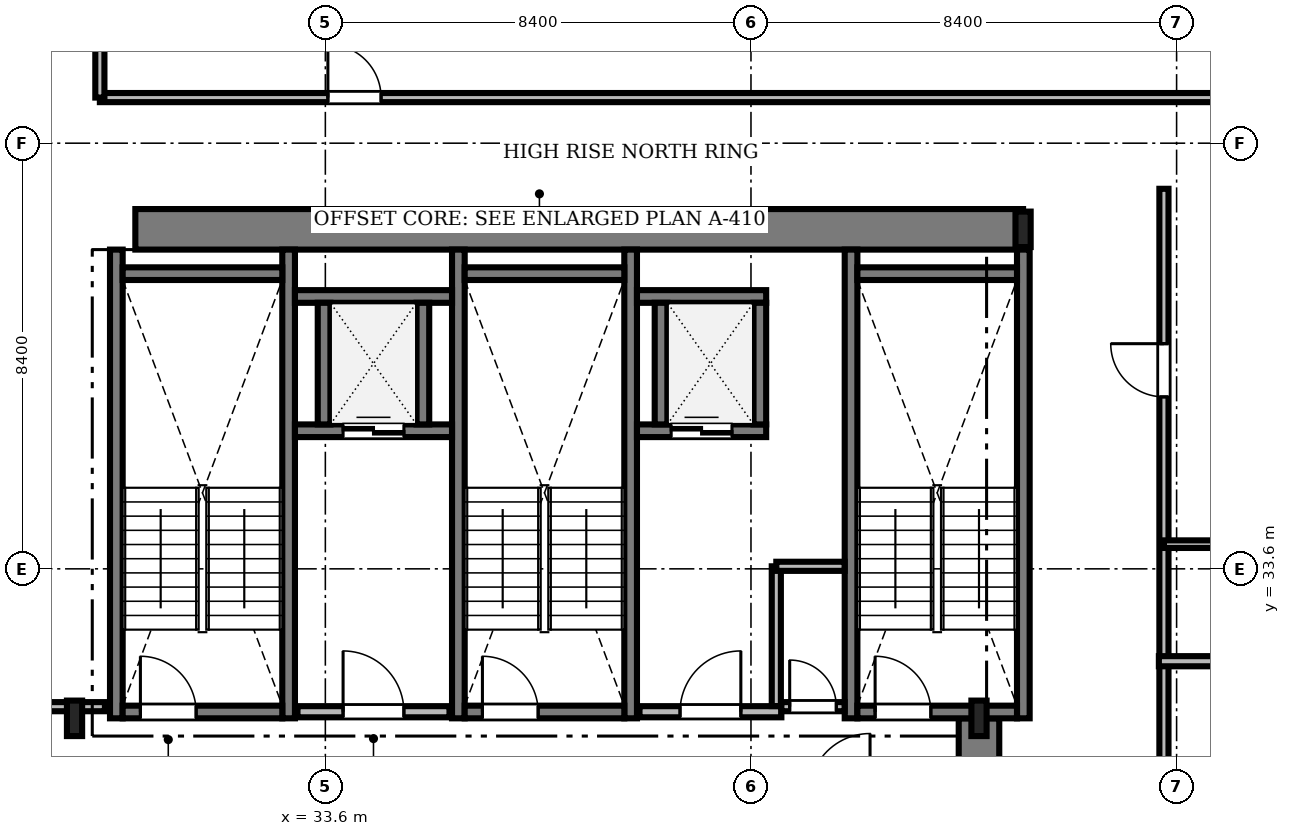
"""IFC4 building model, lengths in metres.
Left out: names, types, materials, properties, quantities, classifications, styles, units other than length and angle.
Written with IfcOpenShell. Run it as: python <this file> out.ifc"""

import sys

from ifc_helpers import new_model, si_unit, direction, frame, frame_2d, origin, origin_2d, place, context, subcontext, project, spatial, rectangle, i_section, extrude, source, transform, mapped, element, fill, save


model = new_model("IFC4")
c1 = context("Model", 3, precision=1e-05, world=origin(), true_north=direction((0.0, 1.0)))
c2 = subcontext(c1, "Body", "Model", "MODEL_VIEW")
j1 = project(units=[si_unit("LENGTHUNIT", "METRE"), si_unit("PLANEANGLEUNIT", "RADIAN")], contexts=[c1])
p1 = place(None, origin())
s1 = spatial("IfcSite", under=j1, at=p1, CompositionType="ELEMENT")
p2 = place(p1, origin())
s2 = spatial("IfcBuilding", under=s1, at=p2, CompositionType="ELEMENT")
p3 = place(p2, frame((0.0, 0.0, 222.3)))
s3 = spatial("IfcBuildingStorey", under=s2, at=p3, CompositionType="ELEMENT", Elevation=222.3)
m1 = source(origin(), c2, "Body", "SweptSolid", [
    extrude(rectangle(XDim=17.52, YDim=0.8, at=frame_2d((8.76, 0.0))), origin(), (0.0, 0.0, 1.0), 3.53),
])
p4 = place(p3, frame((29.85, 40.3, 0.0), z_axis=(0.0, 0.0, 1.0), x_axis=(1.0, 0.0, 0.0)))
e1 = element("IfcWall", 1, at=p4, inside=s3, PredefinedType="SHEAR", context=c2, shape_type="MappedRepresentation", body=[
    mapped(m1, transform((0.0, 0.0, 0.0), scale=1.0)),
])
m2 = source(origin(), c2, "Body", "SweptSolid", [
    extrude(rectangle(XDim=13.15, YDim=0.8, at=frame_2d((6.575, 0.0))), origin(), (0.0, 0.0, 1.0), 3.53),
])
p5 = place(p3, frame((46.5, 17.5, 0.0), z_axis=(0.0, 0.0, 1.0), x_axis=(0.0, 1.0, 0.0)))
e2 = element("IfcWall", 2, at=p5, inside=s3, PredefinedType="SHEAR", context=c2, shape_type="MappedRepresentation", body=[
    mapped(m2, transform((0.0, 0.0, 0.0), scale=1.0)),
])
m3 = source(origin(), c2, "Body", "SweptSolid", [
    extrude(i_section(OverallWidth=0.3, OverallDepth=0.7, WebThickness=0.017, FlangeThickness=0.032, FilletRadius=0.027, at=origin_2d()), origin(), (0.0, 0.0, 1.0), 3.53),
])
for number, where, z_axis, x_axis in (
    (3, (28.65, 30.65, 0.0), (0.0, 0.0, 1.0), (1.0, 0.0, 0.0)),
    (4, (46.5, 30.65, 0.0), (0.0, 0.0, 1.0), (1.0, 0.0, 0.0)),
    (5, (47.37, 40.3, 0.0), (0.0, 0.0, 1.0), (1.0, 0.0, 0.0)),
):
    element("IfcColumn", number, at=place(p3, frame(where, z_axis=z_axis, x_axis=x_axis)), inside=s3, PredefinedType="COLUMN", context=c2, shape_type="MappedRepresentation", body=[
        mapped(m3, transform((0.0, 0.0, 0.0), scale=1.0)),
    ])
m4 = source(origin(), c2, "Body", "SweptSolid", [
    extrude(rectangle(XDim=9.25, YDim=0.25, at=frame_2d((4.625, 0.0))), origin(), (0.0, 0.0, 1.0), 3.55),
])
for number, where, z_axis, x_axis in (
    (6, (29.475, 30.65, 0.0), (0.0, 0.0, 1.0), (0.0, 1.0, 0.0)),
    (7, (32.875, 30.65, 0.0), (0.0, 0.0, 1.0), (0.0, 1.0, 0.0)),
):
    element("IfcWall", number, at=place(p3, frame(where, z_axis=z_axis, x_axis=x_axis)), inside=s3, PredefinedType="SOLIDWALL", context=c2, shape_type="MappedRepresentation", body=[
        mapped(m4, transform((0.0, 0.0, 0.0), scale=1.0)),
    ])
m5 = source(origin(), c2, "Body", "SweptSolid", [
    extrude(rectangle(XDim=3.15, YDim=0.25, at=frame_2d((1.575, 0.0))), origin(), (0.0, 0.0, 1.0), 3.55),
])
p6 = place(p3, frame((29.6, 39.425, 0.0), z_axis=(0.0, 0.0, 1.0), x_axis=(1.0, 0.0, 0.0)))
e8 = element("IfcWall", 8, at=p6, inside=s3, PredefinedType="SOLIDWALL", context=c2, shape_type="MappedRepresentation", body=[
    mapped(m5, transform((0.0, 0.0, 0.0), scale=1.0)),
])
p7 = place(p3, frame((29.6, 30.775, 0.0), z_axis=(0.0, 0.0, 1.0), x_axis=(1.0, 0.0, 0.0)))
e9 = element("IfcWall", 9, at=p7, inside=s3, PredefinedType="SOLIDWALL", context=c2, shape_type="MappedRepresentation", body=[
    mapped(m5, transform((0.0, 0.0, 0.0), scale=1.0)),
])
m6 = source(origin(), c2, "Body", "SweptSolid", [
    extrude(rectangle(XDim=1.1, YDim=2.2, at=frame_2d((0.55, 1.1))), frame((0.0, 0.135, 0.0), z_axis=(0.0, -1.0, 0.0), x_axis=(1.0, 0.0, 0.0)), (0.0, 0.0, 1.0), 0.27),
])
p8 = place(p7, frame((0.35, 0.0, 0.0)))
e10 = element("IfcOpeningElement", 10, at=p8, cuts=e9, PredefinedType="OPENING", context=c2, shape_type="MappedRepresentation", body=[
    mapped(m6, transform((0.0, 0.0, 0.0), scale=1.0)),
])
for number, where, z_axis, x_axis in (
    (11, (36.225, 30.65, 0.0), (0.0, 0.0, 1.0), (0.0, 1.0, 0.0)),
    (12, (39.625, 30.65, 0.0), (0.0, 0.0, 1.0), (0.0, 1.0, 0.0)),
):
    element("IfcWall", number, at=place(p3, frame(where, z_axis=z_axis, x_axis=x_axis)), inside=s3, PredefinedType="SOLIDWALL", context=c2, shape_type="MappedRepresentation", body=[
        mapped(m4, transform((0.0, 0.0, 0.0), scale=1.0)),
    ])
p9 = place(p3, frame((36.35, 39.425, 0.0), z_axis=(0.0, 0.0, 1.0), x_axis=(1.0, 0.0, 0.0)))
e13 = element("IfcWall", 13, at=p9, inside=s3, PredefinedType="SOLIDWALL", context=c2, shape_type="MappedRepresentation", body=[
    mapped(m5, transform((0.0, 0.0, 0.0), scale=1.0)),
])
p10 = place(p3, frame((36.35, 30.775, 0.0), z_axis=(0.0, 0.0, 1.0), x_axis=(1.0, 0.0, 0.0)))
e14 = element("IfcWall", 14, at=p10, inside=s3, PredefinedType="SOLIDWALL", context=c2, shape_type="MappedRepresentation", body=[
    mapped(m5, transform((0.0, 0.0, 0.0), scale=1.0)),
])
p11 = place(p10, frame((0.35, 0.0, 0.0)))
e15 = element("IfcOpeningElement", 15, at=p11, cuts=e14, PredefinedType="OPENING", context=c2, shape_type="MappedRepresentation", body=[
    mapped(m6, transform((0.0, 0.0, 0.0), scale=1.0)),
])
for number, where, z_axis, x_axis in (
    (16, (43.975, 30.65, 0.0), (0.0, 0.0, 1.0), (0.0, 1.0, 0.0)),
    (17, (47.375, 30.65, 0.0), (0.0, 0.0, 1.0), (0.0, 1.0, 0.0)),
):
    element("IfcWall", number, at=place(p3, frame(where, z_axis=z_axis, x_axis=x_axis)), inside=s3, PredefinedType="SOLIDWALL", context=c2, shape_type="MappedRepresentation", body=[
        mapped(m4, transform((0.0, 0.0, 0.0), scale=1.0)),
    ])
p12 = place(p3, frame((44.1, 39.425, 0.0), z_axis=(0.0, 0.0, 1.0), x_axis=(1.0, 0.0, 0.0)))
e18 = element("IfcWall", 18, at=p12, inside=s3, PredefinedType="SOLIDWALL", context=c2, shape_type="MappedRepresentation", body=[
    mapped(m5, transform((0.0, 0.0, 0.0), scale=1.0)),
])
p13 = place(p3, frame((44.1, 30.775, 0.0), z_axis=(0.0, 0.0, 1.0), x_axis=(1.0, 0.0, 0.0)))
e19 = element("IfcWall", 19, at=p13, inside=s3, PredefinedType="SOLIDWALL", context=c2, shape_type="MappedRepresentation", body=[
    mapped(m5, transform((0.0, 0.0, 0.0), scale=1.0)),
])
p14 = place(p13, frame((0.35, 0.0, 0.0)))
e20 = element("IfcOpeningElement", 20, at=p14, cuts=e19, PredefinedType="OPENING", context=c2, shape_type="MappedRepresentation", body=[
    mapped(m6, transform((0.0, 0.0, 0.0), scale=1.0)),
])
m7 = source(origin(), c2, "Body", "SweptSolid", [
    extrude(rectangle(XDim=3.0, YDim=0.22, at=frame_2d((1.5, 0.0))), origin(), (0.0, 0.0, 1.0), 3.53),
])
p15 = place(p3, frame((33.05, 30.78, 0.0), z_axis=(0.0, 0.0, 1.0), x_axis=(1.0, 0.0, 0.0)))
e21 = element("IfcWall", 21, at=p15, inside=s3, PredefinedType="SOLIDWALL", context=c2, shape_type="MappedRepresentation", body=[
    mapped(m7, transform((0.0, 0.0, 0.0), scale=1.0)),
])
m8 = source(origin(), c2, "Body", "SweptSolid", [
    extrude(rectangle(XDim=1.2, YDim=2.2, at=frame_2d((0.6, 1.1))), frame((0.0, 0.12, 0.0), z_axis=(0.0, -1.0, 0.0), x_axis=(1.0, 0.0, 0.0)), (0.0, 0.0, 1.0), 0.24),
])
p16 = place(p15, frame((0.9, 0.0, 0.0)))
e22 = element("IfcOpeningElement", 22, at=p16, cuts=e21, PredefinedType="OPENING", context=c2, shape_type="MappedRepresentation", body=[
    mapped(m8, transform((0.0, 0.0, 0.0), scale=1.0)),
])
m9 = source(origin(), c2, "Body", "SweptSolid", [
    extrude(rectangle(XDim=2.8, YDim=0.22, at=frame_2d((1.4, 0.0))), origin(), (0.0, 0.0, 1.0), 3.53),
])
p17 = place(p3, frame((39.8, 30.78, 0.0), z_axis=(0.0, 0.0, 1.0), x_axis=(1.0, 0.0, 0.0)))
e23 = element("IfcWall", 23, at=p17, inside=s3, PredefinedType="SOLIDWALL", context=c2, shape_type="MappedRepresentation", body=[
    mapped(m9, transform((0.0, 0.0, 0.0), scale=1.0)),
])
p18 = place(p17, frame((0.8, 0.0, 0.0)))
e24 = element("IfcOpeningElement", 24, at=p18, cuts=e23, PredefinedType="OPENING", context=c2, shape_type="MappedRepresentation", body=[
    mapped(m8, transform((0.0, 0.0, 0.0), scale=1.0)),
])
m10 = source(origin(), c2, "Body", "SweptSolid", [
    extrude(rectangle(XDim=3.1, YDim=0.25, at=frame_2d((1.55, 0.0))), origin(), (0.0, 0.0, 1.0), 3.53),
])
p19 = place(p3, frame((33.0, 36.325, 0.0), z_axis=(0.0, 0.0, 1.0), x_axis=(1.0, 0.0, 0.0)))
e25 = element("IfcWall", 25, at=p19, inside=s3, PredefinedType="SOLIDWALL", context=c2, shape_type="MappedRepresentation", body=[
    mapped(m10, transform((0.0, 0.0, 0.0), scale=1.0)),
])
m11 = source(origin(), c2, "Body", "SweptSolid", [
    extrude(rectangle(XDim=1.2, YDim=2.25, at=frame_2d((0.6, 1.125))), frame((0.0, 0.135, 0.0), z_axis=(0.0, -1.0, 0.0), x_axis=(1.0, 0.0, 0.0)), (0.0, 0.0, 1.0), 0.27),
])
p20 = place(p19, frame((0.95, 0.0, 0.0)))
e26 = element("IfcOpeningElement", 26, at=p20, cuts=e25, PredefinedType="OPENING", context=c2, shape_type="MappedRepresentation", body=[
    mapped(m11, transform((0.0, 0.0, 0.0), scale=1.0)),
])
p21 = place(p3, frame((33.0, 38.975, 0.0), z_axis=(0.0, 0.0, 1.0), x_axis=(1.0, 0.0, 0.0)))
e27 = element("IfcWall", 27, at=p21, inside=s3, PredefinedType="SOLIDWALL", context=c2, shape_type="MappedRepresentation", body=[
    mapped(m10, transform((0.0, 0.0, 0.0), scale=1.0)),
])
m12 = source(origin(), c2, "Body", "SweptSolid", [
    extrude(rectangle(XDim=2.4, YDim=0.25, at=frame_2d((1.2, 0.0))), origin(), (0.0, 0.0, 1.0), 3.53),
])
for number, where, z_axis, x_axis in (
    (28, (33.575, 36.45, 0.0), (0.0, 0.0, 1.0), (0.0, 1.0, 0.0)),
    (29, (35.525, 36.45, 0.0), (0.0, 0.0, 1.0), (0.0, 1.0, 0.0)),
):
    element("IfcWall", number, at=place(p3, frame(where, z_axis=z_axis, x_axis=x_axis)), inside=s3, PredefinedType="SOLIDWALL", context=c2, shape_type="MappedRepresentation", body=[
        mapped(m12, transform((0.0, 0.0, 0.0), scale=1.0)),
    ])
m13 = source(origin(), c2, "Body", "SweptSolid", [
    extrude(rectangle(XDim=2.55, YDim=0.25, at=frame_2d((1.275, 0.0))), origin(), (0.0, 0.0, 1.0), 3.53),
])
p22 = place(p3, frame((39.75, 36.325, 0.0), z_axis=(0.0, 0.0, 1.0), x_axis=(1.0, 0.0, 0.0)))
e30 = element("IfcWall", 30, at=p22, inside=s3, PredefinedType="SOLIDWALL", context=c2, shape_type="MappedRepresentation", body=[
    mapped(m13, transform((0.0, 0.0, 0.0), scale=1.0)),
])
p23 = place(p22, frame((0.675, 0.0, 0.0)))
e31 = element("IfcOpeningElement", 31, at=p23, cuts=e30, PredefinedType="OPENING", context=c2, shape_type="MappedRepresentation", body=[
    mapped(m11, transform((0.0, 0.0, 0.0), scale=1.0)),
])
p24 = place(p3, frame((39.75, 38.975, 0.0), z_axis=(0.0, 0.0, 1.0), x_axis=(1.0, 0.0, 0.0)))
e32 = element("IfcWall", 32, at=p24, inside=s3, PredefinedType="SOLIDWALL", context=c2, shape_type="MappedRepresentation", body=[
    mapped(m13, transform((0.0, 0.0, 0.0), scale=1.0)),
])
for number, where, z_axis, x_axis in (
    (33, (40.225, 36.45, 0.0), (0.0, 0.0, 1.0), (0.0, 1.0, 0.0)),
    (34, (42.175, 36.45, 0.0), (0.0, 0.0, 1.0), (0.0, 1.0, 0.0)),
):
    element("IfcWall", number, at=place(p3, frame(where, z_axis=z_axis, x_axis=x_axis)), inside=s3, PredefinedType="SOLIDWALL", context=c2, shape_type="MappedRepresentation", body=[
        mapped(m12, transform((0.0, 0.0, 0.0), scale=1.0)),
    ])
m14 = source(origin(), c2, "Body", "SweptSolid", [
    extrude(rectangle(XDim=28.428, YDim=0.18, at=frame_2d((14.214, 0.0))), origin(), (0.0, 0.0, 1.0), 2.772),
])
p25 = place(p3, frame((29.15, 42.9, 0.0), z_axis=(0.0, 0.0, 1.0), x_axis=(1.0, 0.0, 0.0)))
e35 = element("IfcWall", 35, at=p25, inside=s3, PredefinedType="PARTITIONING", context=c2, shape_type="MappedRepresentation", body=[
    mapped(m14, transform((0.0, 0.0, 0.0), scale=1.0)),
])
m15 = source(origin(), c2, "Body", "SweptSolid", [
    extrude(rectangle(XDim=1.05, YDim=2.2, at=frame_2d((0.525, 1.1))), frame((0.0, 0.1, 0.0), z_axis=(0.0, -1.0, 0.0), x_axis=(1.0, 0.0, 0.0)), (0.0, 0.0, 1.0), 0.2),
])
p26 = place(p25, frame((4.5, 0.0, 0.0)))
e36 = element("IfcOpeningElement", 36, at=p26, cuts=e35, PredefinedType="OPENING", context=c2, shape_type="MappedRepresentation", body=[
    mapped(m15, transform((0.0, 0.0, 0.0), scale=1.0)),
])
m16 = source(origin(), c2, "Body", "SweptSolid", [
    extrude(rectangle(XDim=27.53, YDim=0.18, at=frame_2d((13.765, 0.0))), origin(), (0.0, 0.0, 1.0), 2.972),
])
p27 = place(p3, frame((50.15, 13.57, 0.0), z_axis=(0.0, 0.0, 1.0), x_axis=(0.0, 1.0, 0.0)))
e37 = element("IfcWall", 37, at=p27, inside=s3, PredefinedType="PARTITIONING", context=c2, shape_type="MappedRepresentation", body=[
    mapped(m16, transform((0.0, 0.0, 0.0), scale=1.0)),
])
p28 = place(p27, frame((5.217, 0.0, 0.0)))
e38 = element("IfcOpeningElement", 38, at=p28, cuts=e37, PredefinedType="OPENING", context=c2, shape_type="MappedRepresentation", body=[
    mapped(m15, transform((0.0, 0.0, 0.0), scale=1.0)),
])
p29 = place(p27, frame((14.32, 0.0, 0.0)))
e39 = element("IfcOpeningElement", 39, at=p29, cuts=e37, PredefinedType="OPENING", context=c2, shape_type="MappedRepresentation", body=[
    mapped(m15, transform((0.0, 0.0, 0.0), scale=1.0)),
])
p30 = place(p27, frame((23.423, 0.0, 0.0)))
e40 = element("IfcOpeningElement", 40, at=p30, cuts=e37, PredefinedType="OPENING", context=c2, shape_type="MappedRepresentation", body=[
    mapped(m15, transform((0.0, 0.0, 0.0), scale=1.0)),
])
m17 = source(origin(), c2, "Body", "SweptSolid", [
    extrude(rectangle(XDim=17.828, YDim=0.18, at=frame_2d((8.914, 0.0))), origin(), (0.0, 0.0, 1.0), 2.772),
])
p31 = place(p3, frame((11.422, 30.88, 0.0), z_axis=(0.0, 0.0, 1.0), x_axis=(1.0, 0.0, 0.0)))
e41 = element("IfcWall", 41, at=p31, inside=s3, PredefinedType="PARTITIONING", context=c2, shape_type="MappedRepresentation", body=[
    mapped(m17, transform((0.0, 0.0, 0.0), scale=1.0)),
])
p32 = place(p31, frame((10.778, 0.0, 0.0)))
e42 = element("IfcOpeningElement", 42, at=p32, cuts=e41, PredefinedType="OPENING", context=c2, shape_type="MappedRepresentation", body=[
    mapped(m15, transform((0.0, 0.0, 0.0), scale=1.0)),
])
m18 = source(origin(), c2, "Body", "SweptSolid", [
    extrude(rectangle(XDim=1.248, YDim=0.18, at=frame_2d((0.624, 0.0))), origin(), (0.0, 0.0, 1.0), 3.53),
])
p33 = place(p3, frame((42.6, 30.88, 0.0), z_axis=(0.0, 0.0, 1.0), x_axis=(1.0, 0.0, 0.0)))
e43 = element("IfcWall", 43, at=p33, inside=s3, PredefinedType="PARTITIONING", context=c2, shape_type="MappedRepresentation", body=[
    mapped(m18, transform((0.0, 0.0, 0.0), scale=1.0)),
])
m19 = source(origin(), c2, "Body", "SweptSolid", [
    extrude(rectangle(XDim=0.92, YDim=2.1, at=frame_2d((0.46, 1.05))), frame((0.0, 0.1, 0.0), z_axis=(0.0, -1.0, 0.0), x_axis=(1.0, 0.0, 0.0)), (0.0, 0.0, 1.0), 0.2),
])
p34 = place(p33, frame((0.164, 0.0, 0.0)))
e44 = element("IfcOpeningElement", 44, at=p34, cuts=e43, PredefinedType="OPENING", context=c2, shape_type="MappedRepresentation", body=[
    mapped(m19, transform((0.0, 0.0, 0.0), scale=1.0)),
])
m20 = source(origin(), c2, "Body", "SweptSolid", [
    extrude(rectangle(XDim=7.528, YDim=0.2, at=frame_2d((3.764, 0.0))), origin(), (0.0, 0.0, 1.0), 2.772),
])
p35 = place(p3, frame((50.05, 31.777, 0.0), z_axis=(0.0, 0.0, 1.0), x_axis=(1.0, 0.0, 0.0)))
e45 = element("IfcWall", 45, at=p35, inside=s3, PredefinedType="PARTITIONING", context=c2, shape_type="MappedRepresentation", body=[
    mapped(m20, transform((0.0, 0.0, 0.0), scale=1.0)),
])
m21 = source(origin(), c2, "Body", "SweptSolid", [
    extrude(rectangle(XDim=5.378, YDim=0.18, at=frame_2d((2.689, 0.0))), origin(), (0.0, 0.0, 1.0), 2.772),
])
p36 = place(p3, frame((29.15, 42.9, 0.0), z_axis=(0.0, 0.0, 1.0), x_axis=(0.0, 1.0, 0.0)))
e46 = element("IfcWall", 46, at=p36, inside=s3, PredefinedType="PARTITIONING", context=c2, shape_type="MappedRepresentation", body=[
    mapped(m21, transform((0.0, 0.0, 0.0), scale=1.0)),
])
m22 = source(origin(), c2, "Body", "SweptSolid", [
    extrude(rectangle(XDim=2.758, YDim=0.18, at=frame_2d((1.379, 0.0))), origin(), (0.0, 0.0, 1.0), 3.53),
])
p37 = place(p3, frame((42.5, 30.892, 0.0), z_axis=(0.0, 0.0, 1.0), x_axis=(0.0, 1.0, 0.0)))
e47 = element("IfcWall", 47, at=p37, inside=s3, PredefinedType="PARTITIONING", context=c2, shape_type="MappedRepresentation", body=[
    mapped(m22, transform((0.0, 0.0, 0.0), scale=1.0)),
])
m23 = source(origin(), c2, "Body", "SweptSolid", [
    extrude(rectangle(XDim=2.36, YDim=0.15, at=frame_2d((1.18, 0.0))), origin(), (0.0, 0.0, 1.0), 3.53),
])
p38 = place(p3, frame((50.15, 34.087, 0.0), z_axis=(0.0, 0.0, 1.0), x_axis=(1.0, 0.0, 0.0)))
e48 = element("IfcWall", 48, at=p38, inside=s3, PredefinedType="PARTITIONING", context=c2, shape_type="MappedRepresentation", body=[
    mapped(m23, transform((0.0, 0.0, 0.0), scale=1.0)),
])
m24 = source(origin(), c2, "Body", "SweptSolid", [
    extrude(rectangle(XDim=1.348, YDim=0.18, at=frame_2d((0.674, 0.0))), origin(), (0.0, 0.0, 1.0), 3.53),
])
p39 = place(p3, frame((42.5, 33.65, 0.0), z_axis=(0.0, 0.0, 1.0), x_axis=(1.0, 0.0, 0.0)))
e49 = element("IfcWall", 49, at=p39, inside=s3, PredefinedType="PARTITIONING", context=c2, shape_type="MappedRepresentation", body=[
    mapped(m24, transform((0.0, 0.0, 0.0), scale=1.0)),
])
m25 = source(origin(), c2, "Body", "SweptSolid", [
    extrude(rectangle(XDim=1.1, YDim=2.2, at=frame_2d((0.55, 1.1))), frame((0.0, 0.025, 0.0), z_axis=(0.0, -1.0, 0.0), x_axis=(1.0, 0.0, 0.0)), (0.0, 0.0, 1.0), 0.05),
])
p40 = place(p8, origin())
e50 = element("IfcDoor", 50, at=p40, inside=s3, OperationType="SINGLE_SWING_LEFT", PredefinedType="DOOR", context=c2, shape_type="MappedRepresentation", body=[
    mapped(m25, transform((0.0, 0.0, 0.0), scale=1.0)),
])
fill(e10, e50)
p41 = place(p11, origin())
e51 = element("IfcDoor", 51, at=p41, inside=s3, OperationType="SINGLE_SWING_LEFT", PredefinedType="DOOR", context=c2, shape_type="MappedRepresentation", body=[
    mapped(m25, transform((0.0, 0.0, 0.0), scale=1.0)),
])
fill(e15, e51)
p42 = place(p14, origin())
e52 = element("IfcDoor", 52, at=p42, inside=s3, OperationType="SINGLE_SWING_LEFT", PredefinedType="DOOR", context=c2, shape_type="MappedRepresentation", body=[
    mapped(m25, transform((0.0, 0.0, 0.0), scale=1.0)),
])
fill(e20, e52)
m26 = source(origin(), c2, "Body", "SweptSolid", [
    extrude(rectangle(XDim=1.2, YDim=2.2, at=frame_2d((0.6, 1.1))), frame((0.0, 0.025, 0.0), z_axis=(0.0, -1.0, 0.0), x_axis=(1.0, 0.0, 0.0)), (0.0, 0.0, 1.0), 0.05),
])
p43 = place(p16, origin())
e53 = element("IfcDoor", 53, at=p43, inside=s3, OperationType="SINGLE_SWING_LEFT", PredefinedType="DOOR", context=c2, shape_type="MappedRepresentation", body=[
    mapped(m26, transform((0.0, 0.0, 0.0), scale=1.0)),
])
fill(e22, e53)
p44 = place(p18, origin())
e54 = element("IfcDoor", 54, at=p44, inside=s3, OperationType="SINGLE_SWING_RIGHT", PredefinedType="DOOR", context=c2, shape_type="MappedRepresentation", body=[
    mapped(m26, transform((0.0, 0.0, 0.0), scale=1.0)),
])
fill(e24, e54)
m27 = source(origin(), c2, "Body", "SweptSolid", [
    extrude(rectangle(XDim=1.2, YDim=2.25, at=frame_2d((0.6, 1.125))), frame((0.0, 0.025, 0.0), z_axis=(0.0, -1.0, 0.0), x_axis=(1.0, 0.0, 0.0)), (0.0, 0.0, 1.0), 0.05),
])
p45 = place(p20, origin())
e55 = element("IfcDoor", 55, at=p45, inside=s3, OperationType="DOUBLE_DOOR_SLIDING", PredefinedType="DOOR", context=c2, shape_type="MappedRepresentation", body=[
    mapped(m27, transform((0.0, 0.0, 0.0), scale=1.0)),
])
fill(e26, e55)
p46 = place(p23, origin())
e56 = element("IfcDoor", 56, at=p46, inside=s3, OperationType="DOUBLE_DOOR_SLIDING", PredefinedType="DOOR", context=c2, shape_type="MappedRepresentation", body=[
    mapped(m27, transform((0.0, 0.0, 0.0), scale=1.0)),
])
fill(e31, e56)
m28 = source(origin(), c2, "Body", "SweptSolid", [
    extrude(rectangle(XDim=1.05, YDim=2.2, at=frame_2d((0.525, 1.1))), frame((0.0, 0.025, 0.0), z_axis=(0.0, -1.0, 0.0), x_axis=(1.0, 0.0, 0.0)), (0.0, 0.0, 1.0), 0.05),
])
p47 = place(p26, origin())
e57 = element("IfcDoor", 57, at=p47, inside=s3, OperationType="SINGLE_SWING_LEFT", PredefinedType="DOOR", context=c2, shape_type="MappedRepresentation", body=[
    mapped(m28, transform((0.0, 0.0, 0.0), scale=1.0)),
])
fill(e36, e57)
p48 = place(p30, origin())
e58 = element("IfcDoor", 58, at=p48, inside=s3, OperationType="SINGLE_SWING_RIGHT", PredefinedType="DOOR", context=c2, shape_type="MappedRepresentation", body=[
    mapped(m28, transform((0.0, 0.0, 0.0), scale=1.0)),
])
fill(e40, e58)
m29 = source(origin(), c2, "Body", "SweptSolid", [
    extrude(rectangle(XDim=0.92, YDim=2.1, at=frame_2d((0.46, 1.05))), frame((0.0, 0.025, 0.0), z_axis=(0.0, -1.0, 0.0), x_axis=(1.0, 0.0, 0.0)), (0.0, 0.0, 1.0), 0.05),
])
p49 = place(p34, origin())
e59 = element("IfcDoor", 59, at=p49, inside=s3, OperationType="SINGLE_SWING_LEFT", PredefinedType="DOOR", context=c2, shape_type="MappedRepresentation", body=[
    mapped(m29, transform((0.0, 0.0, 0.0), scale=1.0)),
])
fill(e44, e59)
save(model, sys.argv[1])
